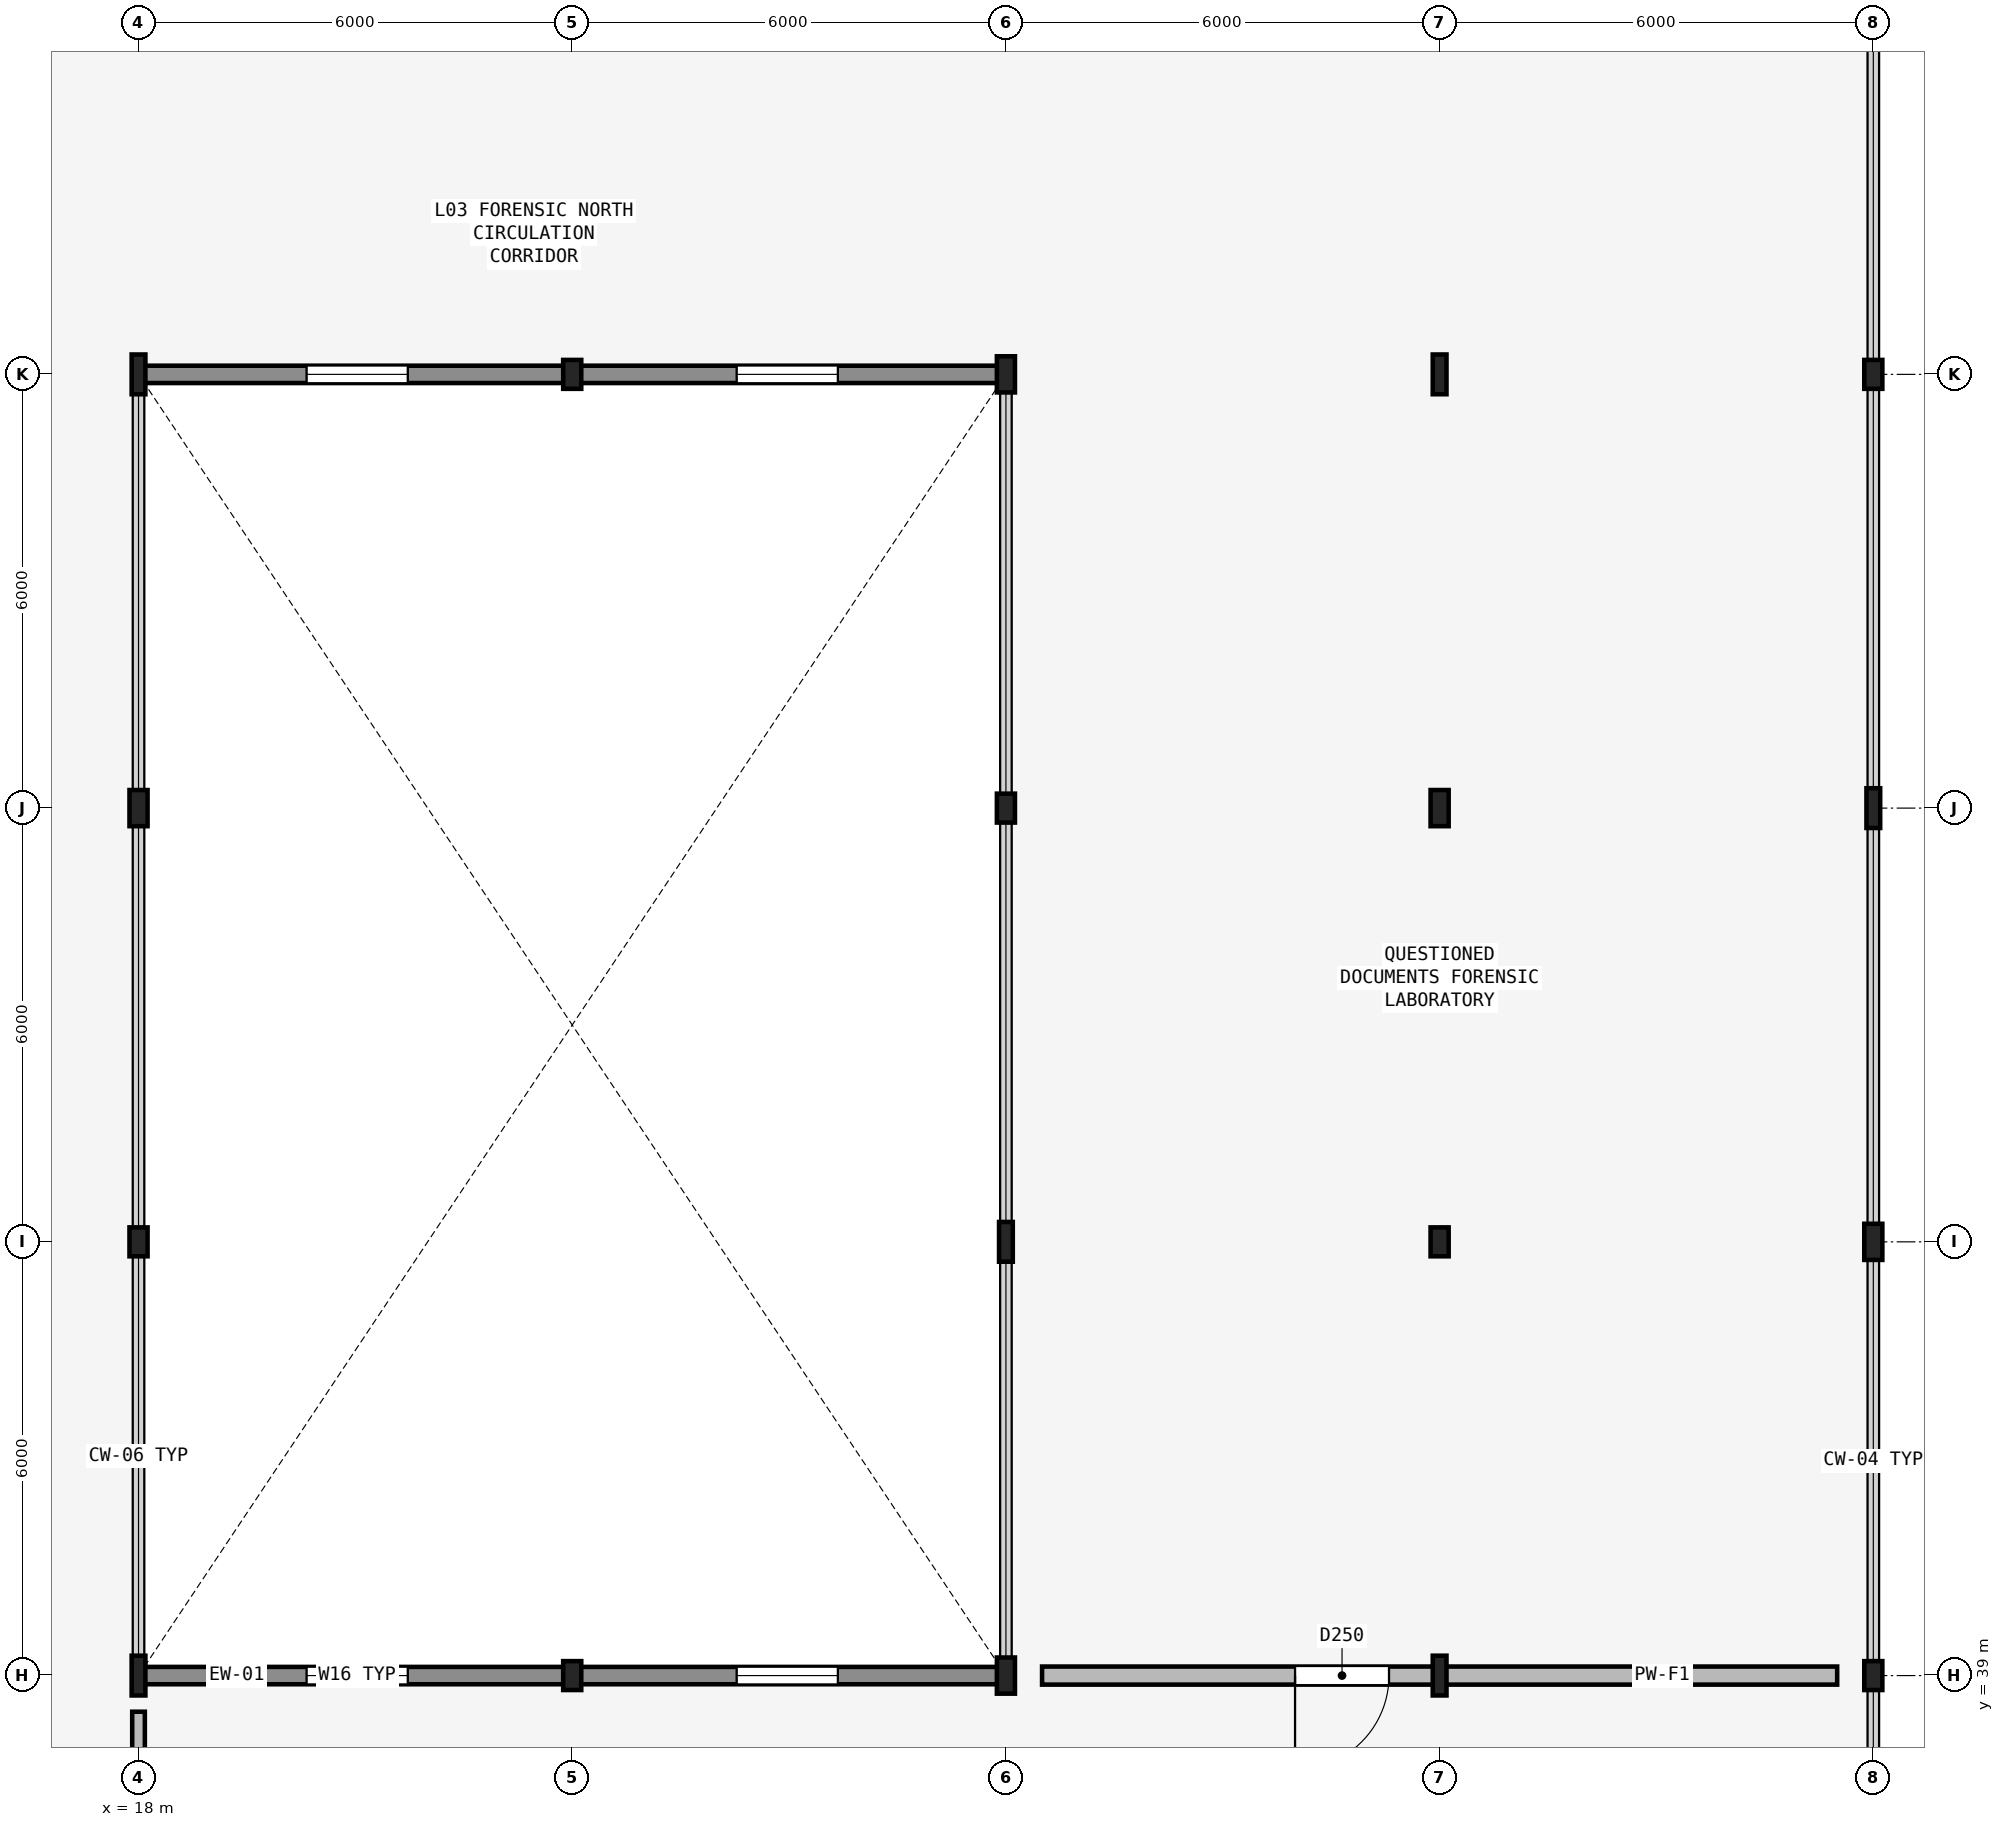
"""IFC4 building model, lengths in metres.
Left out: names, types, materials, properties, quantities, classifications, styles, units other than length and angle.
Written with IfcOpenShell. Run it as: python <this file> out.ifc"""

import sys

from ifc_helpers import new_model, si_unit, direction, frame, frame_2d, origin, origin_2d, place, context, subcontext, project, spatial, rectangle, i_section, extrude, element, fill, save


model = new_model("IFC4")
c1 = context("Model", 3, precision=1e-05, world=origin(), true_north=direction((0.0, 1.0)))
c2 = subcontext(c1, "Body", "Model", "MODEL_VIEW")
j1 = project(units=[si_unit("LENGTHUNIT", "METRE"), si_unit("PLANEANGLEUNIT", "RADIAN")], contexts=[c1])
p1 = place(None, origin())
s1 = spatial("IfcSite", under=j1, at=p1, CompositionType="ELEMENT")
p2 = place(p1, origin())
s2 = spatial("IfcBuilding", under=s1, at=p2, CompositionType="ELEMENT")
p3 = place(p2, frame((0.0, 0.0, 13.5)))
s3 = spatial("IfcBuildingStorey", under=s2, at=p3, CompositionType="ELEMENT", Elevation=13.5)
p4 = place(p3, frame((18.0, 39.0, 0.0), z_axis=(0.0, 0.0, 1.0), x_axis=(1.0, 0.0, 0.0)))
e1 = element("IfcColumn", 1, at=p4, inside=s3, PredefinedType="COLUMN", context=c2, shape_type="SweptSolid", body=[
    extrude(i_section(OverallWidth=0.19, OverallDepth=0.55, WebThickness=0.011, FlangeThickness=0.019, FilletRadius=0.018, at=origin_2d()), origin(), (0.0, 0.0, 1.0), 4.5),
])
p5 = place(p3, frame((18.0, 45.0, 0.0), z_axis=(0.0, 0.0, 1.0), x_axis=(1.0, 0.0, 0.0)))
e2 = element("IfcColumn", 2, at=p5, inside=s3, PredefinedType="COLUMN", context=c2, shape_type="SweptSolid", body=[
    extrude(i_section(OverallWidth=0.25, OverallDepth=0.4, WebThickness=0.01, FlangeThickness=0.013, FilletRadius=0.014, at=origin_2d()), origin(), (0.0, 0.0, 1.0), 4.5),
])
p6 = place(p3, frame((18.0, 51.0, 0.0), z_axis=(0.0, 0.0, 1.0), x_axis=(1.0, 0.0, 0.0)))
e3 = element("IfcColumn", 3, at=p6, inside=s3, PredefinedType="COLUMN", context=c2, shape_type="SweptSolid", body=[
    extrude(i_section(OverallWidth=0.25, OverallDepth=0.5, WebThickness=0.01, FlangeThickness=0.015, FilletRadius=0.015, at=origin_2d()), origin(), (0.0, 0.0, 1.0), 4.5),
])
p7 = place(p3, frame((18.0, 57.0, 0.0), z_axis=(0.0, 0.0, 1.0), x_axis=(1.0, 0.0, 0.0)))
e4 = element("IfcColumn", 4, at=p7, inside=s3, PredefinedType="COLUMN", context=c2, shape_type="SweptSolid", body=[
    extrude(i_section(OverallWidth=0.19, OverallDepth=0.55, WebThickness=0.011, FlangeThickness=0.019, FilletRadius=0.018, at=origin_2d()), origin(), (0.0, 0.0, 1.0), 4.5),
])
for number, where, z_axis, x_axis in (
    (5, (24.0, 39.0, 0.0), (0.0, 0.0, 1.0), (1.0, 0.0, 0.0)),
    (6, (24.0, 57.0, 0.0), (0.0, 0.0, 1.0), (1.0, 0.0, 0.0)),
):
    element("IfcColumn", number, at=place(p3, frame(where, z_axis=z_axis, x_axis=x_axis)), inside=s3, PredefinedType="COLUMN", context=c2, shape_type="SweptSolid", body=[
        extrude(i_section(OverallWidth=0.25, OverallDepth=0.4, WebThickness=0.01, FlangeThickness=0.013, FilletRadius=0.014, at=origin_2d()), origin(), (0.0, 0.0, 1.0), 4.5),
    ])
p8 = place(p3, frame((30.0, 39.0, 0.0), z_axis=(0.0, 0.0, 1.0), x_axis=(1.0, 0.0, 0.0)))
e7 = element("IfcColumn", 7, at=p8, inside=s3, PredefinedType="COLUMN", context=c2, shape_type="SweptSolid", body=[
    extrude(i_section(OverallWidth=0.25, OverallDepth=0.5, WebThickness=0.01, FlangeThickness=0.015, FilletRadius=0.015, at=origin_2d()), origin(), (0.0, 0.0, 1.0), 4.5),
])
p9 = place(p3, frame((30.0, 45.0, 0.0), z_axis=(0.0, 0.0, 1.0), x_axis=(1.0, 0.0, 0.0)))
e8 = element("IfcColumn", 8, at=p9, inside=s3, PredefinedType="COLUMN", context=c2, shape_type="SweptSolid", body=[
    extrude(i_section(OverallWidth=0.19, OverallDepth=0.55, WebThickness=0.011, FlangeThickness=0.019, FilletRadius=0.018, at=origin_2d()), origin(), (0.0, 0.0, 1.0), 4.5),
])
p10 = place(p3, frame((30.0, 51.0, 0.0), z_axis=(0.0, 0.0, 1.0), x_axis=(1.0, 0.0, 0.0)))
e9 = element("IfcColumn", 9, at=p10, inside=s3, PredefinedType="COLUMN", context=c2, shape_type="SweptSolid", body=[
    extrude(i_section(OverallWidth=0.25, OverallDepth=0.4, WebThickness=0.01, FlangeThickness=0.013, FilletRadius=0.014, at=origin_2d()), origin(), (0.0, 0.0, 1.0), 4.5),
])
p11 = place(p3, frame((30.0, 57.0, 0.0), z_axis=(0.0, 0.0, 1.0), x_axis=(1.0, 0.0, 0.0)))
e10 = element("IfcColumn", 10, at=p11, inside=s3, PredefinedType="COLUMN", context=c2, shape_type="SweptSolid", body=[
    extrude(i_section(OverallWidth=0.25, OverallDepth=0.5, WebThickness=0.01, FlangeThickness=0.015, FilletRadius=0.015, at=origin_2d()), origin(), (0.0, 0.0, 1.0), 4.5),
])
p12 = place(p3, frame((36.0, 39.0, 0.0), z_axis=(0.0, 0.0, 1.0), x_axis=(1.0, 0.0, 0.0)))
e11 = element("IfcColumn", 11, at=p12, inside=s3, PredefinedType="COLUMN", context=c2, shape_type="SweptSolid", body=[
    extrude(i_section(OverallWidth=0.19, OverallDepth=0.55, WebThickness=0.011, FlangeThickness=0.019, FilletRadius=0.018, at=origin_2d()), origin(), (0.0, 0.0, 1.0), 4.5),
])
p13 = place(p3, frame((36.0, 45.0, 0.0), z_axis=(0.0, 0.0, 1.0), x_axis=(1.0, 0.0, 0.0)))
e12 = element("IfcColumn", 12, at=p13, inside=s3, PredefinedType="COLUMN", context=c2, shape_type="SweptSolid", body=[
    extrude(i_section(OverallWidth=0.25, OverallDepth=0.4, WebThickness=0.01, FlangeThickness=0.013, FilletRadius=0.014, at=origin_2d()), origin(), (0.0, 0.0, 1.0), 4.5),
])
p14 = place(p3, frame((36.0, 51.0, 0.0), z_axis=(0.0, 0.0, 1.0), x_axis=(1.0, 0.0, 0.0)))
e13 = element("IfcColumn", 13, at=p14, inside=s3, PredefinedType="COLUMN", context=c2, shape_type="SweptSolid", body=[
    extrude(i_section(OverallWidth=0.25, OverallDepth=0.5, WebThickness=0.01, FlangeThickness=0.015, FilletRadius=0.015, at=origin_2d()), origin(), (0.0, 0.0, 1.0), 4.5),
])
p15 = place(p3, frame((36.0, 57.0, 0.0), z_axis=(0.0, 0.0, 1.0), x_axis=(1.0, 0.0, 0.0)))
e14 = element("IfcColumn", 14, at=p15, inside=s3, PredefinedType="COLUMN", context=c2, shape_type="SweptSolid", body=[
    extrude(i_section(OverallWidth=0.19, OverallDepth=0.55, WebThickness=0.011, FlangeThickness=0.019, FilletRadius=0.018, at=origin_2d()), origin(), (0.0, 0.0, 1.0), 4.5),
])
p16 = place(p3, frame((42.0, 39.0, 0.0), z_axis=(0.0, 0.0, 1.0), x_axis=(1.0, 0.0, 0.0)))
e15 = element("IfcColumn", 15, at=p16, inside=s3, PredefinedType="COLUMN", context=c2, shape_type="SweptSolid", body=[
    extrude(i_section(OverallWidth=0.25, OverallDepth=0.4, WebThickness=0.01, FlangeThickness=0.013, FilletRadius=0.014, at=origin_2d()), origin(), (0.0, 0.0, 1.0), 4.5),
])
p17 = place(p3, frame((42.0, 45.0, 0.0), z_axis=(0.0, 0.0, 1.0), x_axis=(1.0, 0.0, 0.0)))
e16 = element("IfcColumn", 16, at=p17, inside=s3, PredefinedType="COLUMN", context=c2, shape_type="SweptSolid", body=[
    extrude(i_section(OverallWidth=0.25, OverallDepth=0.5, WebThickness=0.01, FlangeThickness=0.015, FilletRadius=0.015, at=origin_2d()), origin(), (0.0, 0.0, 1.0), 4.5),
])
p18 = place(p3, frame((42.0, 51.0, 0.0), z_axis=(0.0, 0.0, 1.0), x_axis=(1.0, 0.0, 0.0)))
e17 = element("IfcColumn", 17, at=p18, inside=s3, PredefinedType="COLUMN", context=c2, shape_type="SweptSolid", body=[
    extrude(i_section(OverallWidth=0.19, OverallDepth=0.55, WebThickness=0.011, FlangeThickness=0.019, FilletRadius=0.018, at=origin_2d()), origin(), (0.0, 0.0, 1.0), 4.5),
])
p19 = place(p3, frame((42.0, 57.0, 0.0), z_axis=(0.0, 0.0, 1.0), x_axis=(1.0, 0.0, 0.0)))
e18 = element("IfcColumn", 18, at=p19, inside=s3, PredefinedType="COLUMN", context=c2, shape_type="SweptSolid", body=[
    extrude(i_section(OverallWidth=0.25, OverallDepth=0.4, WebThickness=0.01, FlangeThickness=0.013, FilletRadius=0.014, at=origin_2d()), origin(), (0.0, 0.0, 1.0), 4.5),
])
p20 = place(p3, frame((18.05, 39.0, 0.0), z_axis=(0.0, 0.0, 1.0), x_axis=(1.0, 0.0, 0.0)))
e19 = element("IfcWall", 19, at=p20, inside=s3, PredefinedType="SOLIDWALL", context=c2, shape_type="SweptSolid", body=[
    extrude(rectangle(XDim=5.95, YDim=0.24, at=frame_2d((2.975, 0.0))), origin(), (0.0, 0.0, 1.0), 3.69),
])
p21 = place(p20, frame((2.275, 0.0, 0.85)))
e20 = element("IfcOpeningElement", 20, at=p21, cuts=e19, PredefinedType="OPENING", context=c2, shape_type="SweptSolid", body=[
    extrude(rectangle(XDim=1.4, YDim=1.8, at=frame_2d((0.7, 0.9))), frame((0.0, 0.13, 0.0), z_axis=(0.0, -1.0, 0.0), x_axis=(1.0, 0.0, 0.0)), (0.0, 0.0, 1.0), 0.26),
])
p22 = place(p3, frame((18.05, 57.0, 0.0), z_axis=(0.0, 0.0, 1.0), x_axis=(1.0, 0.0, 0.0)))
e21 = element("IfcWall", 21, at=p22, inside=s3, PredefinedType="SOLIDWALL", context=c2, shape_type="SweptSolid", body=[
    extrude(rectangle(XDim=5.95, YDim=0.24, at=frame_2d((2.975, 0.0))), origin(), (0.0, 0.0, 1.0), 3.59),
])
p23 = place(p22, frame((2.275, 0.0, 0.85)))
e22 = element("IfcOpeningElement", 22, at=p23, cuts=e21, PredefinedType="OPENING", context=c2, shape_type="SweptSolid", body=[
    extrude(rectangle(XDim=1.4, YDim=1.8, at=frame_2d((0.7, 0.9))), frame((0.0, 0.13, 0.0), z_axis=(0.0, -1.0, 0.0), x_axis=(1.0, 0.0, 0.0)), (0.0, 0.0, 1.0), 0.26),
])
p24 = place(p3, frame((24.0, 39.0, 0.0), z_axis=(0.0, 0.0, 1.0), x_axis=(1.0, 0.0, 0.0)))
e23 = element("IfcWall", 23, at=p24, inside=s3, PredefinedType="SOLIDWALL", context=c2, shape_type="SweptSolid", body=[
    extrude(rectangle(XDim=5.95, YDim=0.24, at=frame_2d((2.975, 0.0))), origin(), (0.0, 0.0, 1.0), 3.69),
])
p25 = place(p24, frame((2.275, 0.0, 0.85)))
e24 = element("IfcOpeningElement", 24, at=p25, cuts=e23, PredefinedType="OPENING", context=c2, shape_type="SweptSolid", body=[
    extrude(rectangle(XDim=1.4, YDim=1.8, at=frame_2d((0.7, 0.9))), frame((0.0, 0.13, 0.0), z_axis=(0.0, -1.0, 0.0), x_axis=(1.0, 0.0, 0.0)), (0.0, 0.0, 1.0), 0.26),
])
p26 = place(p3, frame((24.0, 57.0, 0.0), z_axis=(0.0, 0.0, 1.0), x_axis=(1.0, 0.0, 0.0)))
e25 = element("IfcWall", 25, at=p26, inside=s3, PredefinedType="SOLIDWALL", context=c2, shape_type="SweptSolid", body=[
    extrude(rectangle(XDim=5.95, YDim=0.24, at=frame_2d((2.975, 0.0))), origin(), (0.0, 0.0, 1.0), 3.59),
])
p27 = place(p26, frame((2.275, 0.0, 0.85)))
e26 = element("IfcOpeningElement", 26, at=p27, cuts=e25, PredefinedType="OPENING", context=c2, shape_type="SweptSolid", body=[
    extrude(rectangle(XDim=1.4, YDim=1.8, at=frame_2d((0.7, 0.9))), frame((0.0, 0.13, 0.0), z_axis=(0.0, -1.0, 0.0), x_axis=(1.0, 0.0, 0.0)), (0.0, 0.0, 1.0), 0.26),
])
p28 = place(p3, frame((18.0, 21.5, 0.0), z_axis=(0.0, 0.0, 1.0), x_axis=(0.0, 1.0, 0.0)))
e27 = element("IfcWall", 27, at=p28, inside=s3, PredefinedType="PARTITIONING", context=c2, shape_type="SweptSolid", body=[
    extrude(rectangle(XDim=17.0, YDim=0.175, at=frame_2d((8.5, 0.0))), origin(), (0.0, 0.0, 1.0), 3.59),
])
p29 = place(p28, frame((7.85, 0.0, 0.0)))
e28 = element("IfcOpeningElement", 28, at=p29, cuts=e27, PredefinedType="OPENING", context=c2, shape_type="SweptSolid", body=[
    extrude(rectangle(XDim=1.3, YDim=2.2, at=frame_2d((0.65, 1.1))), frame((0.0, 0.097, 0.0), z_axis=(0.0, -1.0, 0.0), x_axis=(1.0, 0.0, 0.0)), (0.0, 0.0, 1.0), 0.195),
])
p30 = place(p3, frame((41.5, 39.0, 0.0), z_axis=(0.0, 0.0, 1.0), x_axis=(-1.0, 0.0, 0.0)))
e29 = element("IfcWall", 29, at=p30, inside=s3, PredefinedType="PARTITIONING", context=c2, shape_type="SweptSolid", body=[
    extrude(rectangle(XDim=11.0, YDim=0.25, at=frame_2d((5.5, 0.0))), origin(), (0.0, 0.0, 1.0), 3.69),
])
p31 = place(p30, frame((6.2, 0.0, 0.0)))
e30 = element("IfcOpeningElement", 30, at=p31, cuts=e29, PredefinedType="OPENING", context=c2, shape_type="SweptSolid", body=[
    extrude(rectangle(XDim=1.3, YDim=2.2, at=frame_2d((0.65, 1.1))), frame((0.0, 0.135, 0.0), z_axis=(0.0, -1.0, 0.0), x_axis=(1.0, 0.0, 0.0)), (0.0, 0.0, 1.0), 0.27),
])
p32 = place(p21, origin())
e31 = element("IfcWindow", 31, at=p32, inside=s3, PartitioningType="SINGLE_PANEL", PredefinedType="WINDOW", context=c2, shape_type="SweptSolid", body=[
    extrude(rectangle(XDim=1.4, YDim=1.8, at=frame_2d((0.7, 0.9))), frame((0.0, 0.03, 0.0), z_axis=(0.0, -1.0, 0.0), x_axis=(1.0, 0.0, 0.0)), (0.0, 0.0, 1.0), 0.06),
])
fill(e20, e31)
p33 = place(p23, origin())
e32 = element("IfcWindow", 32, at=p33, inside=s3, PartitioningType="SINGLE_PANEL", PredefinedType="WINDOW", context=c2, shape_type="SweptSolid", body=[
    extrude(rectangle(XDim=1.4, YDim=1.8, at=frame_2d((0.7, 0.9))), frame((0.0, 0.03, 0.0), z_axis=(0.0, -1.0, 0.0), x_axis=(1.0, 0.0, 0.0)), (0.0, 0.0, 1.0), 0.06),
])
fill(e22, e32)
p34 = place(p25, origin())
e33 = element("IfcWindow", 33, at=p34, inside=s3, PartitioningType="SINGLE_PANEL", PredefinedType="WINDOW", context=c2, shape_type="SweptSolid", body=[
    extrude(rectangle(XDim=1.4, YDim=1.8, at=frame_2d((0.7, 0.9))), frame((0.0, 0.03, 0.0), z_axis=(0.0, -1.0, 0.0), x_axis=(1.0, 0.0, 0.0)), (0.0, 0.0, 1.0), 0.06),
])
fill(e24, e33)
p35 = place(p27, origin())
e34 = element("IfcWindow", 34, at=p35, inside=s3, PartitioningType="SINGLE_PANEL", PredefinedType="WINDOW", context=c2, shape_type="SweptSolid", body=[
    extrude(rectangle(XDim=1.4, YDim=1.8, at=frame_2d((0.7, 0.9))), frame((0.0, 0.03, 0.0), z_axis=(0.0, -1.0, 0.0), x_axis=(1.0, 0.0, 0.0)), (0.0, 0.0, 1.0), 0.06),
])
fill(e26, e34)
p36 = place(p31, origin())
e35 = element("IfcDoor", 35, at=p36, inside=s3, OperationType="SINGLE_SWING_RIGHT", PredefinedType="DOOR", context=c2, shape_type="SweptSolid", body=[
    extrude(rectangle(XDim=1.3, YDim=2.2, at=frame_2d((0.65, 1.1))), frame((0.0, 0.025, 0.0), z_axis=(0.0, -1.0, 0.0), x_axis=(1.0, 0.0, 0.0)), (0.0, 0.0, 1.0), 0.05),
])
fill(e30, e35)
save(model, sys.argv[1])
